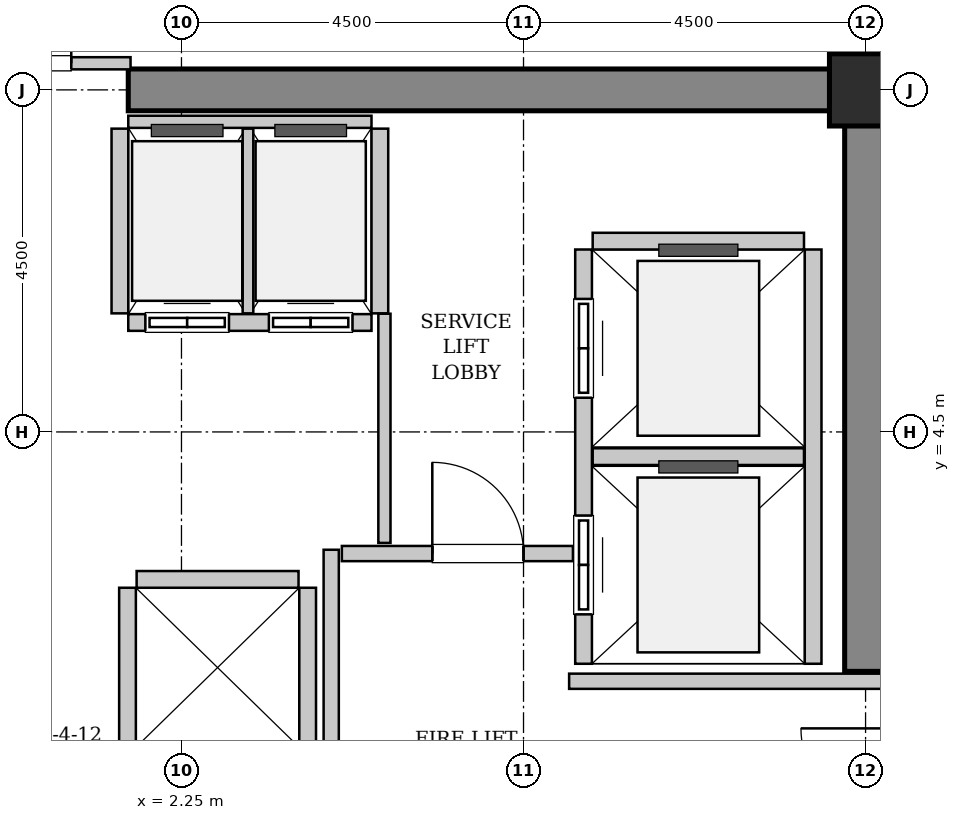
"""IFC4 building model, lengths in metres.
Left out: names, types, materials, properties, quantities, classifications, styles, units other than length and angle.
Written with IfcOpenShell. Run it as: python <this file> out.ifc"""

import sys

from ifc_helpers import new_model, si_unit, direction, frame, frame_2d, origin, origin_2d, place, context, subcontext, project, spatial, rectangle, hollow_rectangle, extrude, source, transform, mapped, element, fill, save


model = new_model("IFC4")
c1 = context("Model", 3, precision=1e-05, world=origin(), true_north=direction((0.0, 1.0)))
c2 = subcontext(c1, "Body", "Model", "MODEL_VIEW")
j1 = project(units=[si_unit("LENGTHUNIT", "METRE"), si_unit("PLANEANGLEUNIT", "RADIAN")], contexts=[c1])
p1 = place(None, origin())
s1 = spatial("IfcSite", under=j1, at=p1, CompositionType="ELEMENT")
p2 = place(p1, origin())
s2 = spatial("IfcBuilding", under=s1, at=p2, CompositionType="ELEMENT")
p3 = place(p2, frame((0.0, 0.0, 106.0)))
s3 = spatial("IfcBuildingStorey", under=s2, at=p3, CompositionType="ELEMENT", Elevation=106.0)
m1 = source(origin(), c2, "Body", "SweptSolid", [
    extrude(rectangle(XDim=9.975, YDim=0.55, at=frame_2d((4.987, 0.0))), origin(), (0.0, 0.0, 1.0), 3.8),
])
p4 = place(p3, frame((1.55, 9.0, 0.0), z_axis=(0.0, 0.0, 1.0), x_axis=(1.0, 0.0, 0.0)))
e1 = element("IfcWall", 1, at=p4, inside=s3, PredefinedType="SHEAR", context=c2, shape_type="MappedRepresentation", body=[
    mapped(m1, transform((0.0, 0.0, 0.0), x_axis=(1.0, 0.0, 0.0), y_axis=(0.0, 1.0, 0.0), z_axis=(0.0, 0.0, 1.0), scale=1.0)),
])
m2 = source(origin(), c2, "Body", "SweptSolid", [
    extrude(rectangle(XDim=7.375, YDim=0.55, at=frame_2d((3.688, 0.0))), origin(), (0.0, 0.0, 1.0), 3.8),
])
p5 = place(p3, frame((11.25, 1.35, 0.0), z_axis=(0.0, 0.0, 1.0), x_axis=(0.0, 1.0, 0.0)))
e2 = element("IfcWall", 2, at=p5, inside=s3, PredefinedType="SHEAR", context=c2, shape_type="MappedRepresentation", body=[
    mapped(m2, transform((0.0, 0.0, 0.0), x_axis=(1.0, 0.0, 0.0), y_axis=(0.0, 1.0, 0.0), z_axis=(0.0, 0.0, 1.0), scale=1.0)),
])
m3 = source(origin(), c2, "Body", "SweptSolid", [
    extrude(hollow_rectangle(XDim=0.95, YDim=0.95, WallThickness=0.045, InnerFilletRadius=0.045, OuterFilletRadius=0.09, at=origin_2d()), origin(), (0.0, 0.0, 1.0), 3.8),
])
p6 = place(p3, frame((11.25, 9.0, 0.0), z_axis=(0.0, 0.0, 1.0), x_axis=(1.0, 0.0, 0.0)))
e3 = element("IfcColumn", 3, at=p6, inside=s3, PredefinedType="COLUMN", context=c2, shape_type="MappedRepresentation", body=[
    mapped(m3, transform((0.0, 0.0, 0.0), x_axis=(1.0, 0.0, 0.0), y_axis=(0.0, 1.0, 0.0), z_axis=(0.0, 0.0, 1.0), scale=1.0)),
])
m4 = source(origin(), c2, "Body", "SweptSolid", [
    extrude(rectangle(XDim=5.45, YDim=0.22, at=frame_2d((2.725, 0.0))), origin(), (0.0, 0.0, 1.0), 3.535),
])
p7 = place(p3, frame((7.54, 6.9, 0.0), z_axis=(0.0, 0.0, 1.0), x_axis=(0.0, -1.0, 0.0)))
e4 = element("IfcWall", 4, at=p7, inside=s3, PredefinedType="SOLIDWALL", context=c2, shape_type="MappedRepresentation", body=[
    mapped(m4, transform((0.0, 0.0, 0.0), x_axis=(1.0, 0.0, 0.0), y_axis=(0.0, 1.0, 0.0), z_axis=(0.0, 0.0, 1.0), scale=1.0)),
])
p8 = place(p7, frame((3.5, 0.0, 0.0)))
e5 = element("IfcOpeningElement", 5, at=p8, cuts=e4, PredefinedType="OPENING", context=c2, shape_type="SweptSolid", body=[
    extrude(rectangle(XDim=1.3, YDim=2.3, at=frame_2d((0.65, 1.15))), frame((0.0, 0.12, 0.0), z_axis=(0.0, -1.0, 0.0), x_axis=(1.0, 0.0, 0.0)), (0.0, 0.0, 1.0), 0.24),
])
p9 = place(p7, frame((0.65, 0.0, 0.0)))
e6 = element("IfcOpeningElement", 6, at=p9, cuts=e4, PredefinedType="OPENING", context=c2, shape_type="SweptSolid", body=[
    extrude(rectangle(XDim=1.3, YDim=2.3, at=frame_2d((0.65, 1.15))), frame((0.0, 0.12, 0.0), z_axis=(0.0, -1.0, 0.0), x_axis=(1.0, 0.0, 0.0)), (0.0, 0.0, 1.0), 0.24),
])
p10 = place(p3, frame((10.56, 1.45, 0.0), z_axis=(0.0, 0.0, 1.0), x_axis=(0.0, 1.0, 0.0)))
e7 = element("IfcWall", 7, at=p10, inside=s3, PredefinedType="SOLIDWALL", context=c2, shape_type="MappedRepresentation", body=[
    mapped(m4, transform((0.0, 0.0, 0.0), x_axis=(1.0, 0.0, 0.0), y_axis=(0.0, 1.0, 0.0), z_axis=(0.0, 0.0, 1.0), scale=1.0)),
])
m5 = source(origin(), c2, "Body", "SweptSolid", [
    extrude(rectangle(XDim=2.78, YDim=0.22, at=frame_2d((1.39, 0.0))), origin(), (0.0, 0.0, 1.0), 3.535),
])
for number, where, z_axis, x_axis in (
    (8, (7.66, 4.175, 0.0), (0.0, 0.0, 1.0), (1.0, 0.0, 0.0)),
    (9, (10.44, 7.01, 0.0), (0.0, 0.0, 1.0), (-1.0, 0.0, 0.0)),
):
    element("IfcWall", number, at=place(p3, frame(where, z_axis=z_axis, x_axis=x_axis)), inside=s3, PredefinedType="SOLIDWALL", context=c2, shape_type="MappedRepresentation", body=[
        mapped(m5, transform((0.0, 0.0, 0.0), x_axis=(1.0, 0.0, 0.0), y_axis=(0.0, 1.0, 0.0), z_axis=(0.0, 0.0, 1.0), scale=1.0)),
    ])
m6 = source(origin(), c2, "Body", "SweptSolid", [
    extrude(rectangle(XDim=3.2, YDim=0.22, at=frame_2d((1.6, 0.0))), origin(), (0.0, 0.0, 1.0), 3.535),
])
p11 = place(p3, frame((1.55, 5.94, 0.0), z_axis=(0.0, 0.0, 1.0), x_axis=(1.0, 0.0, 0.0)))
e10 = element("IfcWall", 10, at=p11, inside=s3, PredefinedType="SOLIDWALL", context=c2, shape_type="MappedRepresentation", body=[
    mapped(m6, transform((0.0, 0.0, 0.0), x_axis=(1.0, 0.0, 0.0), y_axis=(0.0, 1.0, 0.0), z_axis=(0.0, 0.0, 1.0), scale=1.0)),
])
p12 = place(p11, frame((0.225, 0.0, 0.0)))
e11 = element("IfcOpeningElement", 11, at=p12, cuts=e10, PredefinedType="OPENING", context=c2, shape_type="SweptSolid", body=[
    extrude(rectangle(XDim=1.1, YDim=2.2, at=frame_2d((0.55, 1.1))), frame((0.0, 0.12, 0.0), z_axis=(0.0, -1.0, 0.0), x_axis=(1.0, 0.0, 0.0)), (0.0, 0.0, 1.0), 0.24),
])
p13 = place(p11, frame((1.85, 0.0, 0.0)))
e12 = element("IfcOpeningElement", 12, at=p13, cuts=e10, PredefinedType="OPENING", context=c2, shape_type="SweptSolid", body=[
    extrude(rectangle(XDim=1.1, YDim=2.2, at=frame_2d((0.55, 1.1))), frame((0.0, 0.12, 0.0), z_axis=(0.0, -1.0, 0.0), x_axis=(1.0, 0.0, 0.0)), (0.0, 0.0, 1.0), 0.24),
])
m7 = source(origin(), c2, "Body", "SweptSolid", [
    extrude(rectangle(XDim=3.2, YDim=0.16, at=frame_2d((1.6, 0.0))), origin(), (0.0, 0.0, 1.0), 2.425),
])
p14 = place(p3, frame((4.75, 8.58, 0.0), z_axis=(0.0, 0.0, 1.0), x_axis=(-1.0, 0.0, 0.0)))
e13 = element("IfcWall", 13, at=p14, inside=s3, PredefinedType="PARTITIONING", context=c2, shape_type="MappedRepresentation", body=[
    mapped(m7, transform((0.0, 0.0, 0.0), x_axis=(1.0, 0.0, 0.0), y_axis=(0.0, 1.0, 0.0), z_axis=(0.0, 0.0, 1.0), scale=1.0)),
])
m8 = source(origin(), c2, "Body", "SweptSolid", [
    extrude(rectangle(XDim=2.43, YDim=0.22, at=frame_2d((1.215, 0.0))), origin(), (0.0, 0.0, 1.0), 3.535),
])
p15 = place(p3, frame((1.44, 8.49, 0.0), z_axis=(0.0, 0.0, 1.0), x_axis=(0.0, -1.0, 0.0)))
e14 = element("IfcWall", 14, at=p15, inside=s3, PredefinedType="SOLIDWALL", context=c2, shape_type="MappedRepresentation", body=[
    mapped(m8, transform((0.0, 0.0, 0.0), x_axis=(1.0, 0.0, 0.0), y_axis=(0.0, 1.0, 0.0), z_axis=(0.0, 0.0, 1.0), scale=1.0)),
])
m9 = source(origin(), c2, "Body", "SweptSolid", [
    extrude(rectangle(XDim=2.43, YDim=0.14, at=frame_2d((1.215, 0.0))), origin(), (0.0, 0.0, 1.0), 3.535),
])
p16 = place(p3, frame((3.125, 6.06, 0.0), z_axis=(0.0, 0.0, 1.0), x_axis=(0.0, 1.0, 0.0)))
e15 = element("IfcWall", 15, at=p16, inside=s3, PredefinedType="PARTITIONING", context=c2, shape_type="MappedRepresentation", body=[
    mapped(m9, transform((0.0, 0.0, 0.0), x_axis=(1.0, 0.0, 0.0), y_axis=(0.0, 1.0, 0.0), z_axis=(0.0, 0.0, 1.0), scale=1.0)),
])
p17 = place(p3, frame((4.86, 6.06, 0.0), z_axis=(0.0, 0.0, 1.0), x_axis=(0.0, 1.0, 0.0)))
e16 = element("IfcWall", 16, at=p17, inside=s3, PredefinedType="SOLIDWALL", context=c2, shape_type="MappedRepresentation", body=[
    mapped(m8, transform((0.0, 0.0, 0.0), x_axis=(1.0, 0.0, 0.0), y_axis=(0.0, 1.0, 0.0), z_axis=(0.0, 0.0, 1.0), scale=1.0)),
])
m10 = source(origin(), c2, "Body", "SweptSolid", [
    extrude(rectangle(XDim=4.9, YDim=0.22, at=frame_2d((2.45, 0.0))), origin(), (0.0, 0.0, 1.0), 3.535),
])
for number, where, z_axis, x_axis in (
    (17, (1.54, 2.45, 0.0), (0.0, 0.0, 1.0), (0.0, -1.0, 0.0)),
    (18, (3.91, -2.45, 0.0), (0.0, 0.0, 1.0), (0.0, 1.0, 0.0)),
):
    element("IfcWall", number, at=place(p3, frame(where, z_axis=z_axis, x_axis=x_axis)), inside=s3, PredefinedType="SOLIDWALL", context=c2, shape_type="MappedRepresentation", body=[
        mapped(m10, transform((0.0, 0.0, 0.0), x_axis=(1.0, 0.0, 0.0), y_axis=(0.0, 1.0, 0.0), z_axis=(0.0, 0.0, 1.0), scale=1.0)),
    ])
m11 = source(origin(), c2, "Body", "SweptSolid", [
    extrude(rectangle(XDim=2.13, YDim=0.22, at=frame_2d((1.065, 0.0))), origin(), (0.0, 0.0, 1.0), 3.535),
])
p18 = place(p3, frame((3.79, 2.56, 0.0), z_axis=(0.0, 0.0, 1.0), x_axis=(-1.0, 0.0, 0.0)))
e19 = element("IfcWall", 19, at=p18, inside=s3, PredefinedType="SOLIDWALL", context=c2, shape_type="MappedRepresentation", body=[
    mapped(m11, transform((0.0, 0.0, 0.0), x_axis=(1.0, 0.0, 0.0), y_axis=(0.0, 1.0, 0.0), z_axis=(0.0, 0.0, 1.0), scale=1.0)),
])
m12 = source(origin(), c2, "Body", "SweptSolid", [
    extrude(rectangle(XDim=5.9, YDim=0.2, at=frame_2d((2.95, 0.0))), origin(), (0.0, 0.0, 1.0), 3.535),
])
p19 = place(p3, frame((4.22, -2.95, 0.0), z_axis=(0.0, 0.0, 1.0), x_axis=(0.0, 1.0, 0.0)))
e20 = element("IfcWall", 20, at=p19, inside=s3, PredefinedType="PARTITIONING", context=c2, shape_type="MappedRepresentation", body=[
    mapped(m12, transform((0.0, 0.0, 0.0), x_axis=(1.0, 0.0, 0.0), y_axis=(0.0, 1.0, 0.0), z_axis=(0.0, 0.0, 1.0), scale=1.0)),
])
m13 = source(origin(), c2, "Body", "SweptSolid", [
    extrude(rectangle(XDim=3.04, YDim=0.2, at=frame_2d((1.52, 0.0))), origin(), (0.0, 0.0, 1.0), 3.535),
])
p20 = place(p3, frame((4.36, 2.9, 0.0), z_axis=(0.0, 0.0, 1.0), x_axis=(1.0, 0.0, 0.0)))
e21 = element("IfcWall", 21, at=p20, inside=s3, PredefinedType="PARTITIONING", context=c2, shape_type="MappedRepresentation", body=[
    mapped(m13, transform((0.0, 0.0, 0.0), x_axis=(1.0, 0.0, 0.0), y_axis=(0.0, 1.0, 0.0), z_axis=(0.0, 0.0, 1.0), scale=1.0)),
])
p21 = place(p20, frame((1.19, 0.0, 0.0)))
e22 = element("IfcOpeningElement", 22, at=p21, cuts=e21, PredefinedType="OPENING", context=c2, shape_type="SweptSolid", body=[
    extrude(rectangle(XDim=1.2, YDim=2.15, at=frame_2d((0.6, 1.075))), frame((0.0, 0.11, 0.0), z_axis=(0.0, -1.0, 0.0), x_axis=(1.0, 0.0, 0.0)), (0.0, 0.0, 1.0), 0.22),
])
m14 = source(origin(), c2, "Body", "SweptSolid", [
    extrude(rectangle(XDim=4.11, YDim=0.2, at=frame_2d((2.055, 0.0))), origin(), (0.0, 0.0, 1.0), 3.535),
])
p22 = place(p3, frame((7.35, 1.22, 0.0), z_axis=(0.0, 0.0, 1.0), x_axis=(1.0, 0.0, 0.0)))
e23 = element("IfcWall", 23, at=p22, inside=s3, PredefinedType="PARTITIONING", context=c2, shape_type="MappedRepresentation", body=[
    mapped(m14, transform((0.0, 0.0, 0.0), x_axis=(1.0, 0.0, 0.0), y_axis=(0.0, 1.0, 0.0), z_axis=(0.0, 0.0, 1.0), scale=1.0)),
])
m15 = source(origin(), c2, "Body", "SweptSolid", [
    extrude(rectangle(XDim=3.16, YDim=0.16, at=frame_2d((1.58, 0.0))), origin(), (0.0, 0.0, 1.0), 2.425),
])
p23 = place(p3, frame((-1.58, 9.35, 0.0), z_axis=(0.0, 0.0, 1.0), x_axis=(1.0, 0.0, 0.0)))
e24 = element("IfcWall", 24, at=p23, inside=s3, PredefinedType="PARTITIONING", context=c2, shape_type="MappedRepresentation", body=[
    mapped(m15, transform((0.0, 0.0, 0.0), x_axis=(1.0, 0.0, 0.0), y_axis=(0.0, 1.0, 0.0), z_axis=(0.0, 0.0, 1.0), scale=1.0)),
])
p24 = place(p23, frame((0.78, 0.0, 0.0)))
e25 = element("IfcOpeningElement", 25, at=p24, cuts=e24, PredefinedType="OPENING", context=c2, shape_type="SweptSolid", body=[
    extrude(rectangle(XDim=1.6, YDim=2.3, at=frame_2d((0.8, 1.15))), frame((0.0, 0.09, 0.0), z_axis=(0.0, -1.0, 0.0), x_axis=(1.0, 0.0, 0.0)), (0.0, 0.0, 1.0), 0.18),
])
m16 = source(origin(), c2, "Body", "SweptSolid", [
    extrude(rectangle(XDim=3.015, YDim=0.16, at=frame_2d((1.507, 0.0))), origin(), (0.0, 0.0, 1.0), 3.535),
])
p25 = place(p3, frame((4.92, 3.04, 0.0), z_axis=(0.0, 0.0, 1.0), x_axis=(0.0, 1.0, 0.0)))
e26 = element("IfcWall", 26, at=p25, inside=s3, PredefinedType="PARTITIONING", context=c2, shape_type="MappedRepresentation", body=[
    mapped(m16, transform((0.0, 0.0, 0.0), x_axis=(1.0, 0.0, 0.0), y_axis=(0.0, 1.0, 0.0), z_axis=(0.0, 0.0, 1.0), scale=1.0)),
])
m17 = source(origin(), c2, "Body", "SweptSolid", [
    extrude(rectangle(XDim=1.3, YDim=2.3, at=frame_2d((0.65, 1.15))), frame((0.0, 0.025, 0.0), z_axis=(0.0, -1.0, 0.0), x_axis=(1.0, 0.0, 0.0)), (0.0, 0.0, 1.0), 0.05),
])
p26 = place(p8, origin())
e27 = element("IfcDoor", 27, at=p26, inside=s3, OperationType="SLIDING_TO_RIGHT", PredefinedType="DOOR", context=c2, shape_type="MappedRepresentation", body=[
    mapped(m17, transform((0.0, 0.0, 0.0), x_axis=(1.0, 0.0, 0.0), y_axis=(0.0, 1.0, 0.0), z_axis=(0.0, 0.0, 1.0), scale=1.0)),
])
fill(e5, e27)
p27 = place(p9, origin())
e28 = element("IfcDoor", 28, at=p27, inside=s3, OperationType="SLIDING_TO_RIGHT", PredefinedType="DOOR", context=c2, shape_type="MappedRepresentation", body=[
    mapped(m17, transform((0.0, 0.0, 0.0), x_axis=(1.0, 0.0, 0.0), y_axis=(0.0, 1.0, 0.0), z_axis=(0.0, 0.0, 1.0), scale=1.0)),
])
fill(e6, e28)
m18 = source(origin(), c2, "Body", "SweptSolid", [
    extrude(rectangle(XDim=1.1, YDim=2.2, at=frame_2d((0.55, 1.1))), frame((0.0, 0.025, 0.0), z_axis=(0.0, -1.0, 0.0), x_axis=(1.0, 0.0, 0.0)), (0.0, 0.0, 1.0), 0.05),
])
p28 = place(p12, origin())
e29 = element("IfcDoor", 29, at=p28, inside=s3, OperationType="DOUBLE_DOOR_SLIDING", PredefinedType="DOOR", context=c2, shape_type="MappedRepresentation", body=[
    mapped(m18, transform((0.0, 0.0, 0.0), x_axis=(1.0, 0.0, 0.0), y_axis=(0.0, 1.0, 0.0), z_axis=(0.0, 0.0, 1.0), scale=1.0)),
])
fill(e11, e29)
p29 = place(p13, origin())
e30 = element("IfcDoor", 30, at=p29, inside=s3, OperationType="DOUBLE_DOOR_SLIDING", PredefinedType="DOOR", context=c2, shape_type="MappedRepresentation", body=[
    mapped(m18, transform((0.0, 0.0, 0.0), x_axis=(1.0, 0.0, 0.0), y_axis=(0.0, 1.0, 0.0), z_axis=(0.0, 0.0, 1.0), scale=1.0)),
])
fill(e12, e30)
m19 = source(origin(), c2, "Body", "SweptSolid", [
    extrude(rectangle(XDim=1.2, YDim=2.15, at=frame_2d((0.6, 1.075))), frame((0.0, 0.025, 0.0), z_axis=(0.0, -1.0, 0.0), x_axis=(1.0, 0.0, 0.0)), (0.0, 0.0, 1.0), 0.05),
])
p30 = place(p21, origin())
e31 = element("IfcDoor", 31, at=p30, inside=s3, OperationType="SINGLE_SWING_LEFT", PredefinedType="DOOR", context=c2, shape_type="MappedRepresentation", body=[
    mapped(m19, transform((0.0, 0.0, 0.0), x_axis=(1.0, 0.0, 0.0), y_axis=(0.0, 1.0, 0.0), z_axis=(0.0, 0.0, 1.0), scale=1.0)),
])
fill(e22, e31)
m20 = source(origin(), c2, "Body", "SweptSolid", [
    extrude(rectangle(XDim=1.6, YDim=2.3, at=frame_2d((0.8, 1.15))), frame((0.0, 0.025, 0.0), z_axis=(0.0, -1.0, 0.0), x_axis=(1.0, 0.0, 0.0)), (0.0, 0.0, 1.0), 0.05),
])
p31 = place(p24, origin())
e32 = element("IfcDoor", 32, at=p31, inside=s3, OperationType="DOUBLE_DOOR_SINGLE_SWING", PredefinedType="DOOR", context=c2, shape_type="MappedRepresentation", body=[
    mapped(m20, transform((0.0, 0.0, 0.0), x_axis=(1.0, 0.0, 0.0), y_axis=(0.0, 1.0, 0.0), z_axis=(0.0, 0.0, 1.0), scale=1.0)),
])
fill(e25, e32)
save(model, sys.argv[1])
